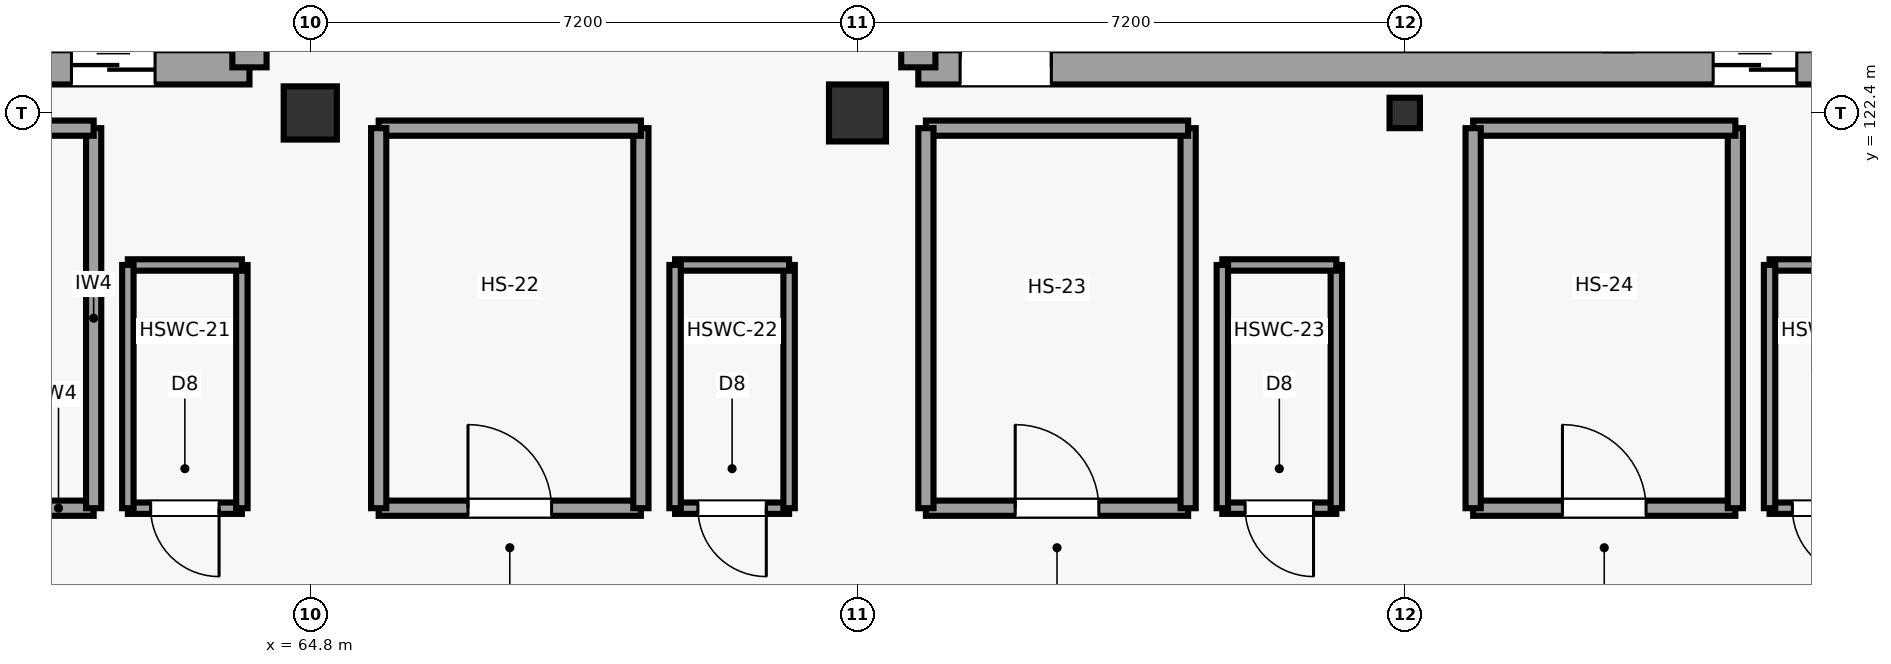
"""IFC4 building model, lengths in metres.
Left out: names, types, materials, properties, quantities, classifications, styles, units other than length and angle.
Written with IfcOpenShell. Run it as: python <this file> out.ifc"""

import sys

from ifc_helpers import new_model, si_unit, direction, frame, frame_2d, origin, origin_2d, place, context, subcontext, project, spatial, rectangle, hollow_rectangle, extrude, element, fill, save


model = new_model("IFC4")
c1 = context("Model", 3, precision=1e-05, world=origin(), true_north=direction((0.0, 1.0)))
c2 = subcontext(c1, "Body", "Model", "MODEL_VIEW")
j1 = project(units=[si_unit("LENGTHUNIT", "METRE"), si_unit("PLANEANGLEUNIT", "RADIAN")], contexts=[c1])
p1 = place(None, origin())
s1 = spatial("IfcSite", under=j1, at=p1, CompositionType="ELEMENT")
p2 = place(p1, origin())
s2 = spatial("IfcBuilding", under=s1, at=p2, CompositionType="ELEMENT")
p3 = place(p2, frame((0.0, 0.0, 9.6)))
s3 = spatial("IfcBuildingStorey", under=s2, at=p3, CompositionType="ELEMENT", Elevation=9.6)
p4 = place(p3, frame((64.8, 122.4, 0.0), z_axis=(0.0, 0.0, 1.0), x_axis=(1.0, 0.0, 0.0)))
e1 = element("IfcColumn", 1, at=p4, inside=s3, PredefinedType="COLUMN", context=c2, shape_type="SweptSolid", body=[
    extrude(rectangle(XDim=0.7, YDim=0.7, at=origin_2d()), origin(), (0.0, 0.0, 1.0), 4.2),
])
p5 = place(p3, frame((72.0, 122.4, 0.0), z_axis=(0.0, 0.0, 1.0), x_axis=(1.0, 0.0, 0.0)))
e2 = element("IfcColumn", 2, at=p5, inside=s3, PredefinedType="COLUMN", context=c2, shape_type="SweptSolid", body=[
    extrude(rectangle(XDim=0.75, YDim=0.75, at=origin_2d()), origin(), (0.0, 0.0, 1.0), 4.2),
])
p6 = place(p3, frame((79.2, 122.4, 0.0), z_axis=(0.0, 0.0, 1.0), x_axis=(1.0, 0.0, 0.0)))
e3 = element("IfcColumn", 3, at=p6, inside=s3, PredefinedType="COLUMN", context=c2, shape_type="SweptSolid", body=[
    extrude(hollow_rectangle(XDim=0.4, YDim=0.4, WallThickness=0.02, at=origin_2d()), origin(), (0.0, 0.0, 1.0), 4.2),
])
p7 = place(p3, frame((72.8, 123.0, 0.0), z_axis=(0.0, 0.0, 1.0), x_axis=(1.0, 0.0, 0.0)))
e4 = element("IfcWall", 4, at=p7, inside=s3, PredefinedType="SHEAR", context=c2, shape_type="SweptSolid", body=[
    extrude(rectangle(XDim=12.8, YDim=0.45, at=frame_2d((6.4, 0.0))), origin(), (0.0, 0.0, 1.0), 3.88),
])
p8 = place(p7, frame((0.55, 0.0, 0.0)))
e5 = element("IfcOpeningElement", 5, at=p8, cuts=e4, PredefinedType="OPENING", context=c2, shape_type="SweptSolid", body=[
    extrude(rectangle(XDim=1.2, YDim=2.25, at=frame_2d((0.6, 1.125))), frame((0.0, 0.235, 0.0), z_axis=(0.0, -1.0, 0.0), x_axis=(1.0, 0.0, 0.0)), (0.0, 0.0, 1.0), 0.47),
])
p9 = place(p7, frame((10.458, 0.0, 0.0)))
e6 = element("IfcOpeningElement", 6, at=p9, cuts=e4, PredefinedType="OPENING", context=c2, shape_type="SweptSolid", body=[
    extrude(rectangle(XDim=1.1, YDim=2.2, at=frame_2d((0.55, 1.1))), frame((0.0, 0.235, 0.0), z_axis=(0.0, -1.0, 0.0), x_axis=(1.0, 0.0, 0.0)), (0.0, 0.0, 1.0), 0.47),
])
p10 = place(p3, frame((72.8, 123.0, 0.0), z_axis=(0.0, 0.0, 1.0), x_axis=(0.0, 1.0, 0.0)))
e7 = element("IfcWall", 7, at=p10, inside=s3, PredefinedType="SHEAR", context=c2, shape_type="SweptSolid", body=[
    extrude(rectangle(XDim=6.1, YDim=0.45, at=frame_2d((3.05, 0.0))), origin(), (0.0, 0.0, 1.0), 3.88),
])
p11 = place(p3, frame((51.2, 123.0, 0.0), z_axis=(0.0, 0.0, 1.0), x_axis=(1.0, 0.0, 0.0)))
e8 = element("IfcWall", 8, at=p11, inside=s3, PredefinedType="SHEAR", context=c2, shape_type="SweptSolid", body=[
    extrude(rectangle(XDim=12.8, YDim=0.45, at=frame_2d((6.4, 0.0))), origin(), (0.0, 0.0, 1.0), 3.88),
])
p12 = place(p11, frame((0.55, 0.0, 0.0)))
e9 = element("IfcOpeningElement", 9, at=p12, cuts=e8, PredefinedType="OPENING", context=c2, shape_type="SweptSolid", body=[
    extrude(rectangle(XDim=1.2, YDim=2.25, at=frame_2d((0.6, 1.125))), frame((0.0, 0.235, 0.0), z_axis=(0.0, -1.0, 0.0), x_axis=(1.0, 0.0, 0.0)), (0.0, 0.0, 1.0), 0.47),
])
p13 = place(p11, frame((10.458, 0.0, 0.0)))
e10 = element("IfcOpeningElement", 10, at=p13, cuts=e8, PredefinedType="OPENING", context=c2, shape_type="SweptSolid", body=[
    extrude(rectangle(XDim=1.1, YDim=2.2, at=frame_2d((0.55, 1.1))), frame((0.0, 0.235, 0.0), z_axis=(0.0, -1.0, 0.0), x_axis=(1.0, 0.0, 0.0)), (0.0, 0.0, 1.0), 0.47),
])
p14 = place(p3, frame((64.0, 123.0, 0.0), z_axis=(0.0, 0.0, 1.0), x_axis=(0.0, 1.0, 0.0)))
e11 = element("IfcWall", 11, at=p14, inside=s3, PredefinedType="SHEAR", context=c2, shape_type="SweptSolid", body=[
    extrude(rectangle(XDim=6.1, YDim=0.45, at=frame_2d((3.05, 0.0))), origin(), (0.0, 0.0, 1.0), 3.88),
])
p15 = place(p3, frame((58.5, 117.2, 0.0), z_axis=(0.0, 0.0, 1.0), x_axis=(1.0, 0.0, 0.0)))
e12 = element("IfcWall", 12, at=p15, inside=s3, PredefinedType="PARTITIONING", context=c2, shape_type="SweptSolid", body=[
    extrude(rectangle(XDim=3.45, YDim=0.2, at=frame_2d((1.725, 0.0))), origin(), (0.0, 0.0, 1.0), 2.94),
])
p16 = place(p15, frame((1.175, 0.0, 0.0)))
e13 = element("IfcOpeningElement", 13, at=p16, cuts=e12, PredefinedType="OPENING", context=c2, shape_type="SweptSolid", body=[
    extrude(rectangle(XDim=1.1, YDim=2.25, at=frame_2d((0.55, 1.125))), frame((0.0, 0.11, 0.0), z_axis=(0.0, -1.0, 0.0), x_axis=(1.0, 0.0, 0.0)), (0.0, 0.0, 1.0), 0.22),
])
p17 = place(p3, frame((61.95, 117.2, 0.0), z_axis=(0.0, 0.0, 1.0), x_axis=(0.0, 1.0, 0.0)))
e14 = element("IfcWall", 14, at=p17, inside=s3, PredefinedType="PARTITIONING", context=c2, shape_type="SweptSolid", body=[
    extrude(rectangle(XDim=5.0, YDim=0.2, at=frame_2d((2.5, 0.0))), origin(), (0.0, 0.0, 1.0), 2.94),
])
p18 = place(p3, frame((61.95, 122.2, 0.0), z_axis=(0.0, 0.0, 1.0), x_axis=(-1.0, 0.0, 0.0)))
e15 = element("IfcWall", 15, at=p18, inside=s3, PredefinedType="PARTITIONING", context=c2, shape_type="SweptSolid", body=[
    extrude(rectangle(XDim=3.45, YDim=0.2, at=frame_2d((1.725, 0.0))), origin(), (0.0, 0.0, 1.0), 2.94),
])
p19 = place(p3, frame((62.4, 117.2, 0.0), z_axis=(0.0, 0.0, 1.0), x_axis=(1.0, 0.0, 0.0)))
e16 = element("IfcWall", 16, at=p19, inside=s3, PredefinedType="PARTITIONING", context=c2, shape_type="SweptSolid", body=[
    extrude(rectangle(XDim=1.5, YDim=0.15, at=frame_2d((0.75, 0.0))), origin(), (0.0, 0.0, 1.0), 2.94),
])
p20 = place(p19, frame((0.3, 0.0, 0.0)))
e17 = element("IfcOpeningElement", 17, at=p20, cuts=e16, PredefinedType="OPENING", context=c2, shape_type="SweptSolid", body=[
    extrude(rectangle(XDim=0.9, YDim=2.15, at=frame_2d((0.45, 1.075))), frame((0.0, 0.085, 0.0), z_axis=(0.0, -1.0, 0.0), x_axis=(1.0, 0.0, 0.0)), (0.0, 0.0, 1.0), 0.17),
])
p21 = place(p3, frame((63.9, 117.2, 0.0), z_axis=(0.0, 0.0, 1.0), x_axis=(0.0, 1.0, 0.0)))
e18 = element("IfcWall", 18, at=p21, inside=s3, PredefinedType="PARTITIONING", context=c2, shape_type="SweptSolid", body=[
    extrude(rectangle(XDim=3.2, YDim=0.15, at=frame_2d((1.6, 0.0))), origin(), (0.0, 0.0, 1.0), 2.94),
])
p22 = place(p3, frame((63.9, 120.4, 0.0), z_axis=(0.0, 0.0, 1.0), x_axis=(-1.0, 0.0, 0.0)))
e19 = element("IfcWall", 19, at=p22, inside=s3, PredefinedType="PARTITIONING", context=c2, shape_type="SweptSolid", body=[
    extrude(rectangle(XDim=1.5, YDim=0.15, at=frame_2d((0.75, 0.0))), origin(), (0.0, 0.0, 1.0), 2.94),
])
p23 = place(p3, frame((62.4, 120.4, 0.0), z_axis=(0.0, 0.0, 1.0), x_axis=(0.0, -1.0, 0.0)))
e20 = element("IfcWall", 20, at=p23, inside=s3, PredefinedType="PARTITIONING", context=c2, shape_type="SweptSolid", body=[
    extrude(rectangle(XDim=3.2, YDim=0.15, at=frame_2d((1.6, 0.0))), origin(), (0.0, 0.0, 1.0), 2.94),
])
p24 = place(p3, frame((65.7, 117.2, 0.0), z_axis=(0.0, 0.0, 1.0), x_axis=(1.0, 0.0, 0.0)))
e21 = element("IfcWall", 21, at=p24, inside=s3, PredefinedType="PARTITIONING", context=c2, shape_type="SweptSolid", body=[
    extrude(rectangle(XDim=3.45, YDim=0.2, at=frame_2d((1.725, 0.0))), origin(), (0.0, 0.0, 1.0), 2.94),
])
p25 = place(p24, frame((1.175, 0.0, 0.0)))
e22 = element("IfcOpeningElement", 22, at=p25, cuts=e21, PredefinedType="OPENING", context=c2, shape_type="SweptSolid", body=[
    extrude(rectangle(XDim=1.1, YDim=2.25, at=frame_2d((0.55, 1.125))), frame((0.0, 0.11, 0.0), z_axis=(0.0, -1.0, 0.0), x_axis=(1.0, 0.0, 0.0)), (0.0, 0.0, 1.0), 0.22),
])
p26 = place(p3, frame((69.15, 117.2, 0.0), z_axis=(0.0, 0.0, 1.0), x_axis=(0.0, 1.0, 0.0)))
e23 = element("IfcWall", 23, at=p26, inside=s3, PredefinedType="PARTITIONING", context=c2, shape_type="SweptSolid", body=[
    extrude(rectangle(XDim=5.0, YDim=0.2, at=frame_2d((2.5, 0.0))), origin(), (0.0, 0.0, 1.0), 2.94),
])
p27 = place(p3, frame((69.15, 122.2, 0.0), z_axis=(0.0, 0.0, 1.0), x_axis=(-1.0, 0.0, 0.0)))
e24 = element("IfcWall", 24, at=p27, inside=s3, PredefinedType="PARTITIONING", context=c2, shape_type="SweptSolid", body=[
    extrude(rectangle(XDim=3.45, YDim=0.2, at=frame_2d((1.725, 0.0))), origin(), (0.0, 0.0, 1.0), 2.94),
])
p28 = place(p3, frame((65.7, 122.2, 0.0), z_axis=(0.0, 0.0, 1.0), x_axis=(0.0, -1.0, 0.0)))
e25 = element("IfcWall", 25, at=p28, inside=s3, PredefinedType="PARTITIONING", context=c2, shape_type="SweptSolid", body=[
    extrude(rectangle(XDim=5.0, YDim=0.2, at=frame_2d((2.5, 0.0))), origin(), (0.0, 0.0, 1.0), 2.94),
])
p29 = place(p3, frame((69.6, 117.2, 0.0), z_axis=(0.0, 0.0, 1.0), x_axis=(1.0, 0.0, 0.0)))
e26 = element("IfcWall", 26, at=p29, inside=s3, PredefinedType="PARTITIONING", context=c2, shape_type="SweptSolid", body=[
    extrude(rectangle(XDim=1.5, YDim=0.15, at=frame_2d((0.75, 0.0))), origin(), (0.0, 0.0, 1.0), 2.94),
])
p30 = place(p29, frame((0.3, 0.0, 0.0)))
e27 = element("IfcOpeningElement", 27, at=p30, cuts=e26, PredefinedType="OPENING", context=c2, shape_type="SweptSolid", body=[
    extrude(rectangle(XDim=0.9, YDim=2.15, at=frame_2d((0.45, 1.075))), frame((0.0, 0.085, 0.0), z_axis=(0.0, -1.0, 0.0), x_axis=(1.0, 0.0, 0.0)), (0.0, 0.0, 1.0), 0.17),
])
p31 = place(p3, frame((71.1, 117.2, 0.0), z_axis=(0.0, 0.0, 1.0), x_axis=(0.0, 1.0, 0.0)))
e28 = element("IfcWall", 28, at=p31, inside=s3, PredefinedType="PARTITIONING", context=c2, shape_type="SweptSolid", body=[
    extrude(rectangle(XDim=3.2, YDim=0.15, at=frame_2d((1.6, 0.0))), origin(), (0.0, 0.0, 1.0), 2.94),
])
p32 = place(p3, frame((71.1, 120.4, 0.0), z_axis=(0.0, 0.0, 1.0), x_axis=(-1.0, 0.0, 0.0)))
e29 = element("IfcWall", 29, at=p32, inside=s3, PredefinedType="PARTITIONING", context=c2, shape_type="SweptSolid", body=[
    extrude(rectangle(XDim=1.5, YDim=0.15, at=frame_2d((0.75, 0.0))), origin(), (0.0, 0.0, 1.0), 2.94),
])
p33 = place(p3, frame((69.6, 120.4, 0.0), z_axis=(0.0, 0.0, 1.0), x_axis=(0.0, -1.0, 0.0)))
e30 = element("IfcWall", 30, at=p33, inside=s3, PredefinedType="PARTITIONING", context=c2, shape_type="SweptSolid", body=[
    extrude(rectangle(XDim=3.2, YDim=0.15, at=frame_2d((1.6, 0.0))), origin(), (0.0, 0.0, 1.0), 2.94),
])
p34 = place(p3, frame((72.9, 117.2, 0.0), z_axis=(0.0, 0.0, 1.0), x_axis=(1.0, 0.0, 0.0)))
e31 = element("IfcWall", 31, at=p34, inside=s3, PredefinedType="PARTITIONING", context=c2, shape_type="SweptSolid", body=[
    extrude(rectangle(XDim=3.45, YDim=0.2, at=frame_2d((1.725, 0.0))), origin(), (0.0, 0.0, 1.0), 2.94),
])
p35 = place(p34, frame((1.175, 0.0, 0.0)))
e32 = element("IfcOpeningElement", 32, at=p35, cuts=e31, PredefinedType="OPENING", context=c2, shape_type="SweptSolid", body=[
    extrude(rectangle(XDim=1.1, YDim=2.25, at=frame_2d((0.55, 1.125))), frame((0.0, 0.11, 0.0), z_axis=(0.0, -1.0, 0.0), x_axis=(1.0, 0.0, 0.0)), (0.0, 0.0, 1.0), 0.22),
])
p36 = place(p3, frame((76.35, 117.2, 0.0), z_axis=(0.0, 0.0, 1.0), x_axis=(0.0, 1.0, 0.0)))
e33 = element("IfcWall", 33, at=p36, inside=s3, PredefinedType="PARTITIONING", context=c2, shape_type="SweptSolid", body=[
    extrude(rectangle(XDim=5.0, YDim=0.2, at=frame_2d((2.5, 0.0))), origin(), (0.0, 0.0, 1.0), 2.94),
])
p37 = place(p3, frame((76.35, 122.2, 0.0), z_axis=(0.0, 0.0, 1.0), x_axis=(-1.0, 0.0, 0.0)))
e34 = element("IfcWall", 34, at=p37, inside=s3, PredefinedType="PARTITIONING", context=c2, shape_type="SweptSolid", body=[
    extrude(rectangle(XDim=3.45, YDim=0.2, at=frame_2d((1.725, 0.0))), origin(), (0.0, 0.0, 1.0), 2.94),
])
p38 = place(p3, frame((72.9, 122.2, 0.0), z_axis=(0.0, 0.0, 1.0), x_axis=(0.0, -1.0, 0.0)))
e35 = element("IfcWall", 35, at=p38, inside=s3, PredefinedType="PARTITIONING", context=c2, shape_type="SweptSolid", body=[
    extrude(rectangle(XDim=5.0, YDim=0.2, at=frame_2d((2.5, 0.0))), origin(), (0.0, 0.0, 1.0), 2.94),
])
p39 = place(p3, frame((76.8, 117.2, 0.0), z_axis=(0.0, 0.0, 1.0), x_axis=(1.0, 0.0, 0.0)))
e36 = element("IfcWall", 36, at=p39, inside=s3, PredefinedType="PARTITIONING", context=c2, shape_type="SweptSolid", body=[
    extrude(rectangle(XDim=1.5, YDim=0.15, at=frame_2d((0.75, 0.0))), origin(), (0.0, 0.0, 1.0), 2.94),
])
p40 = place(p39, frame((0.3, 0.0, 0.0)))
e37 = element("IfcOpeningElement", 37, at=p40, cuts=e36, PredefinedType="OPENING", context=c2, shape_type="SweptSolid", body=[
    extrude(rectangle(XDim=0.9, YDim=2.15, at=frame_2d((0.45, 1.075))), frame((0.0, 0.085, 0.0), z_axis=(0.0, -1.0, 0.0), x_axis=(1.0, 0.0, 0.0)), (0.0, 0.0, 1.0), 0.17),
])
p41 = place(p3, frame((78.3, 117.2, 0.0), z_axis=(0.0, 0.0, 1.0), x_axis=(0.0, 1.0, 0.0)))
e38 = element("IfcWall", 38, at=p41, inside=s3, PredefinedType="PARTITIONING", context=c2, shape_type="SweptSolid", body=[
    extrude(rectangle(XDim=3.2, YDim=0.15, at=frame_2d((1.6, 0.0))), origin(), (0.0, 0.0, 1.0), 2.94),
])
p42 = place(p3, frame((78.3, 120.4, 0.0), z_axis=(0.0, 0.0, 1.0), x_axis=(-1.0, 0.0, 0.0)))
e39 = element("IfcWall", 39, at=p42, inside=s3, PredefinedType="PARTITIONING", context=c2, shape_type="SweptSolid", body=[
    extrude(rectangle(XDim=1.5, YDim=0.15, at=frame_2d((0.75, 0.0))), origin(), (0.0, 0.0, 1.0), 2.94),
])
p43 = place(p3, frame((76.8, 120.4, 0.0), z_axis=(0.0, 0.0, 1.0), x_axis=(0.0, -1.0, 0.0)))
e40 = element("IfcWall", 40, at=p43, inside=s3, PredefinedType="PARTITIONING", context=c2, shape_type="SweptSolid", body=[
    extrude(rectangle(XDim=3.2, YDim=0.15, at=frame_2d((1.6, 0.0))), origin(), (0.0, 0.0, 1.0), 2.94),
])
p44 = place(p3, frame((80.1, 117.2, 0.0), z_axis=(0.0, 0.0, 1.0), x_axis=(1.0, 0.0, 0.0)))
e41 = element("IfcWall", 41, at=p44, inside=s3, PredefinedType="PARTITIONING", context=c2, shape_type="SweptSolid", body=[
    extrude(rectangle(XDim=3.45, YDim=0.2, at=frame_2d((1.725, 0.0))), origin(), (0.0, 0.0, 1.0), 2.94),
])
p45 = place(p44, frame((1.175, 0.0, 0.0)))
e42 = element("IfcOpeningElement", 42, at=p45, cuts=e41, PredefinedType="OPENING", context=c2, shape_type="SweptSolid", body=[
    extrude(rectangle(XDim=1.1, YDim=2.25, at=frame_2d((0.55, 1.125))), frame((0.0, 0.11, 0.0), z_axis=(0.0, -1.0, 0.0), x_axis=(1.0, 0.0, 0.0)), (0.0, 0.0, 1.0), 0.22),
])
p46 = place(p3, frame((83.55, 117.2, 0.0), z_axis=(0.0, 0.0, 1.0), x_axis=(0.0, 1.0, 0.0)))
e43 = element("IfcWall", 43, at=p46, inside=s3, PredefinedType="PARTITIONING", context=c2, shape_type="SweptSolid", body=[
    extrude(rectangle(XDim=5.0, YDim=0.2, at=frame_2d((2.5, 0.0))), origin(), (0.0, 0.0, 1.0), 2.94),
])
p47 = place(p3, frame((83.55, 122.2, 0.0), z_axis=(0.0, 0.0, 1.0), x_axis=(-1.0, 0.0, 0.0)))
e44 = element("IfcWall", 44, at=p47, inside=s3, PredefinedType="PARTITIONING", context=c2, shape_type="SweptSolid", body=[
    extrude(rectangle(XDim=3.45, YDim=0.2, at=frame_2d((1.725, 0.0))), origin(), (0.0, 0.0, 1.0), 2.94),
])
p48 = place(p3, frame((80.1, 122.2, 0.0), z_axis=(0.0, 0.0, 1.0), x_axis=(0.0, -1.0, 0.0)))
e45 = element("IfcWall", 45, at=p48, inside=s3, PredefinedType="PARTITIONING", context=c2, shape_type="SweptSolid", body=[
    extrude(rectangle(XDim=5.0, YDim=0.2, at=frame_2d((2.5, 0.0))), origin(), (0.0, 0.0, 1.0), 2.94),
])
p49 = place(p3, frame((84.0, 117.2, 0.0), z_axis=(0.0, 0.0, 1.0), x_axis=(1.0, 0.0, 0.0)))
e46 = element("IfcWall", 46, at=p49, inside=s3, PredefinedType="PARTITIONING", context=c2, shape_type="SweptSolid", body=[
    extrude(rectangle(XDim=1.5, YDim=0.15, at=frame_2d((0.75, 0.0))), origin(), (0.0, 0.0, 1.0), 2.94),
])
p50 = place(p49, frame((0.3, 0.0, 0.0)))
e47 = element("IfcOpeningElement", 47, at=p50, cuts=e46, PredefinedType="OPENING", context=c2, shape_type="SweptSolid", body=[
    extrude(rectangle(XDim=0.9, YDim=2.15, at=frame_2d((0.45, 1.075))), frame((0.0, 0.085, 0.0), z_axis=(0.0, -1.0, 0.0), x_axis=(1.0, 0.0, 0.0)), (0.0, 0.0, 1.0), 0.17),
])
p51 = place(p3, frame((85.5, 120.4, 0.0), z_axis=(0.0, 0.0, 1.0), x_axis=(-1.0, 0.0, 0.0)))
e48 = element("IfcWall", 48, at=p51, inside=s3, PredefinedType="PARTITIONING", context=c2, shape_type="SweptSolid", body=[
    extrude(rectangle(XDim=1.5, YDim=0.15, at=frame_2d((0.75, 0.0))), origin(), (0.0, 0.0, 1.0), 2.94),
])
p52 = place(p3, frame((84.0, 120.4, 0.0), z_axis=(0.0, 0.0, 1.0), x_axis=(0.0, -1.0, 0.0)))
e49 = element("IfcWall", 49, at=p52, inside=s3, PredefinedType="PARTITIONING", context=c2, shape_type="SweptSolid", body=[
    extrude(rectangle(XDim=3.2, YDim=0.15, at=frame_2d((1.6, 0.0))), origin(), (0.0, 0.0, 1.0), 2.94),
])
p53 = place(p8, origin())
e50 = element("IfcDoor", 50, at=p53, inside=s3, OperationType="SINGLE_SWING_RIGHT", PredefinedType="DOOR", context=c2, shape_type="SweptSolid", body=[
    extrude(rectangle(XDim=1.2, YDim=2.25, at=frame_2d((0.6, 1.125))), frame((0.0, 0.025, 0.0), z_axis=(0.0, -1.0, 0.0), x_axis=(1.0, 0.0, 0.0)), (0.0, 0.0, 1.0), 0.05),
])
fill(e5, e50)
p54 = place(p9, origin())
e51 = element("IfcDoor", 51, at=p54, inside=s3, OperationType="SLIDING_TO_RIGHT", PredefinedType="DOOR", context=c2, shape_type="SweptSolid", body=[
    extrude(rectangle(XDim=1.1, YDim=2.2, at=frame_2d((0.55, 1.1))), frame((0.0, 0.025, 0.0), z_axis=(0.0, -1.0, 0.0), x_axis=(1.0, 0.0, 0.0)), (0.0, 0.0, 1.0), 0.05),
])
fill(e6, e51)
p55 = place(p13, origin())
e52 = element("IfcDoor", 52, at=p55, inside=s3, OperationType="SLIDING_TO_LEFT", PredefinedType="DOOR", context=c2, shape_type="SweptSolid", body=[
    extrude(rectangle(XDim=1.1, YDim=2.2, at=frame_2d((0.55, 1.1))), frame((0.0, 0.025, 0.0), z_axis=(0.0, -1.0, 0.0), x_axis=(1.0, 0.0, 0.0)), (0.0, 0.0, 1.0), 0.05),
])
fill(e10, e52)
p56 = place(p20, frame((0.9, 0.0, 0.0), z_axis=(0.0, 0.0, 1.0), x_axis=(-1.0, 0.0, 0.0)))
e53 = element("IfcDoor", 53, at=p56, inside=s3, OperationType="SINGLE_SWING_RIGHT", PredefinedType="DOOR", context=c2, shape_type="SweptSolid", body=[
    extrude(rectangle(XDim=0.9, YDim=2.15, at=frame_2d((0.45, 1.075))), frame((0.0, 0.025, 0.0), z_axis=(0.0, -1.0, 0.0), x_axis=(1.0, 0.0, 0.0)), (0.0, 0.0, 1.0), 0.05),
])
fill(e17, e53)
p57 = place(p25, origin())
e54 = element("IfcDoor", 54, at=p57, inside=s3, OperationType="SINGLE_SWING_LEFT", PredefinedType="DOOR", context=c2, shape_type="SweptSolid", body=[
    extrude(rectangle(XDim=1.1, YDim=2.25, at=frame_2d((0.55, 1.125))), frame((0.0, 0.025, 0.0), z_axis=(0.0, -1.0, 0.0), x_axis=(1.0, 0.0, 0.0)), (0.0, 0.0, 1.0), 0.05),
])
fill(e22, e54)
p58 = place(p30, frame((0.9, 0.0, 0.0), z_axis=(0.0, 0.0, 1.0), x_axis=(-1.0, 0.0, 0.0)))
e55 = element("IfcDoor", 55, at=p58, inside=s3, OperationType="SINGLE_SWING_RIGHT", PredefinedType="DOOR", context=c2, shape_type="SweptSolid", body=[
    extrude(rectangle(XDim=0.9, YDim=2.15, at=frame_2d((0.45, 1.075))), frame((0.0, 0.025, 0.0), z_axis=(0.0, -1.0, 0.0), x_axis=(1.0, 0.0, 0.0)), (0.0, 0.0, 1.0), 0.05),
])
fill(e27, e55)
p59 = place(p35, origin())
e56 = element("IfcDoor", 56, at=p59, inside=s3, OperationType="SINGLE_SWING_LEFT", PredefinedType="DOOR", context=c2, shape_type="SweptSolid", body=[
    extrude(rectangle(XDim=1.1, YDim=2.25, at=frame_2d((0.55, 1.125))), frame((0.0, 0.025, 0.0), z_axis=(0.0, -1.0, 0.0), x_axis=(1.0, 0.0, 0.0)), (0.0, 0.0, 1.0), 0.05),
])
fill(e32, e56)
p60 = place(p40, frame((0.9, 0.0, 0.0), z_axis=(0.0, 0.0, 1.0), x_axis=(-1.0, 0.0, 0.0)))
e57 = element("IfcDoor", 57, at=p60, inside=s3, OperationType="SINGLE_SWING_RIGHT", PredefinedType="DOOR", context=c2, shape_type="SweptSolid", body=[
    extrude(rectangle(XDim=0.9, YDim=2.15, at=frame_2d((0.45, 1.075))), frame((0.0, 0.025, 0.0), z_axis=(0.0, -1.0, 0.0), x_axis=(1.0, 0.0, 0.0)), (0.0, 0.0, 1.0), 0.05),
])
fill(e37, e57)
p61 = place(p45, origin())
e58 = element("IfcDoor", 58, at=p61, inside=s3, OperationType="SINGLE_SWING_LEFT", PredefinedType="DOOR", context=c2, shape_type="SweptSolid", body=[
    extrude(rectangle(XDim=1.1, YDim=2.25, at=frame_2d((0.55, 1.125))), frame((0.0, 0.025, 0.0), z_axis=(0.0, -1.0, 0.0), x_axis=(1.0, 0.0, 0.0)), (0.0, 0.0, 1.0), 0.05),
])
fill(e42, e58)
p62 = place(p50, frame((0.9, 0.0, 0.0), z_axis=(0.0, 0.0, 1.0), x_axis=(-1.0, 0.0, 0.0)))
e59 = element("IfcDoor", 59, at=p62, inside=s3, OperationType="SINGLE_SWING_RIGHT", PredefinedType="DOOR", context=c2, shape_type="SweptSolid", body=[
    extrude(rectangle(XDim=0.9, YDim=2.15, at=frame_2d((0.45, 1.075))), frame((0.0, 0.025, 0.0), z_axis=(0.0, -1.0, 0.0), x_axis=(1.0, 0.0, 0.0)), (0.0, 0.0, 1.0), 0.05),
])
fill(e47, e59)
save(model, sys.argv[1])
